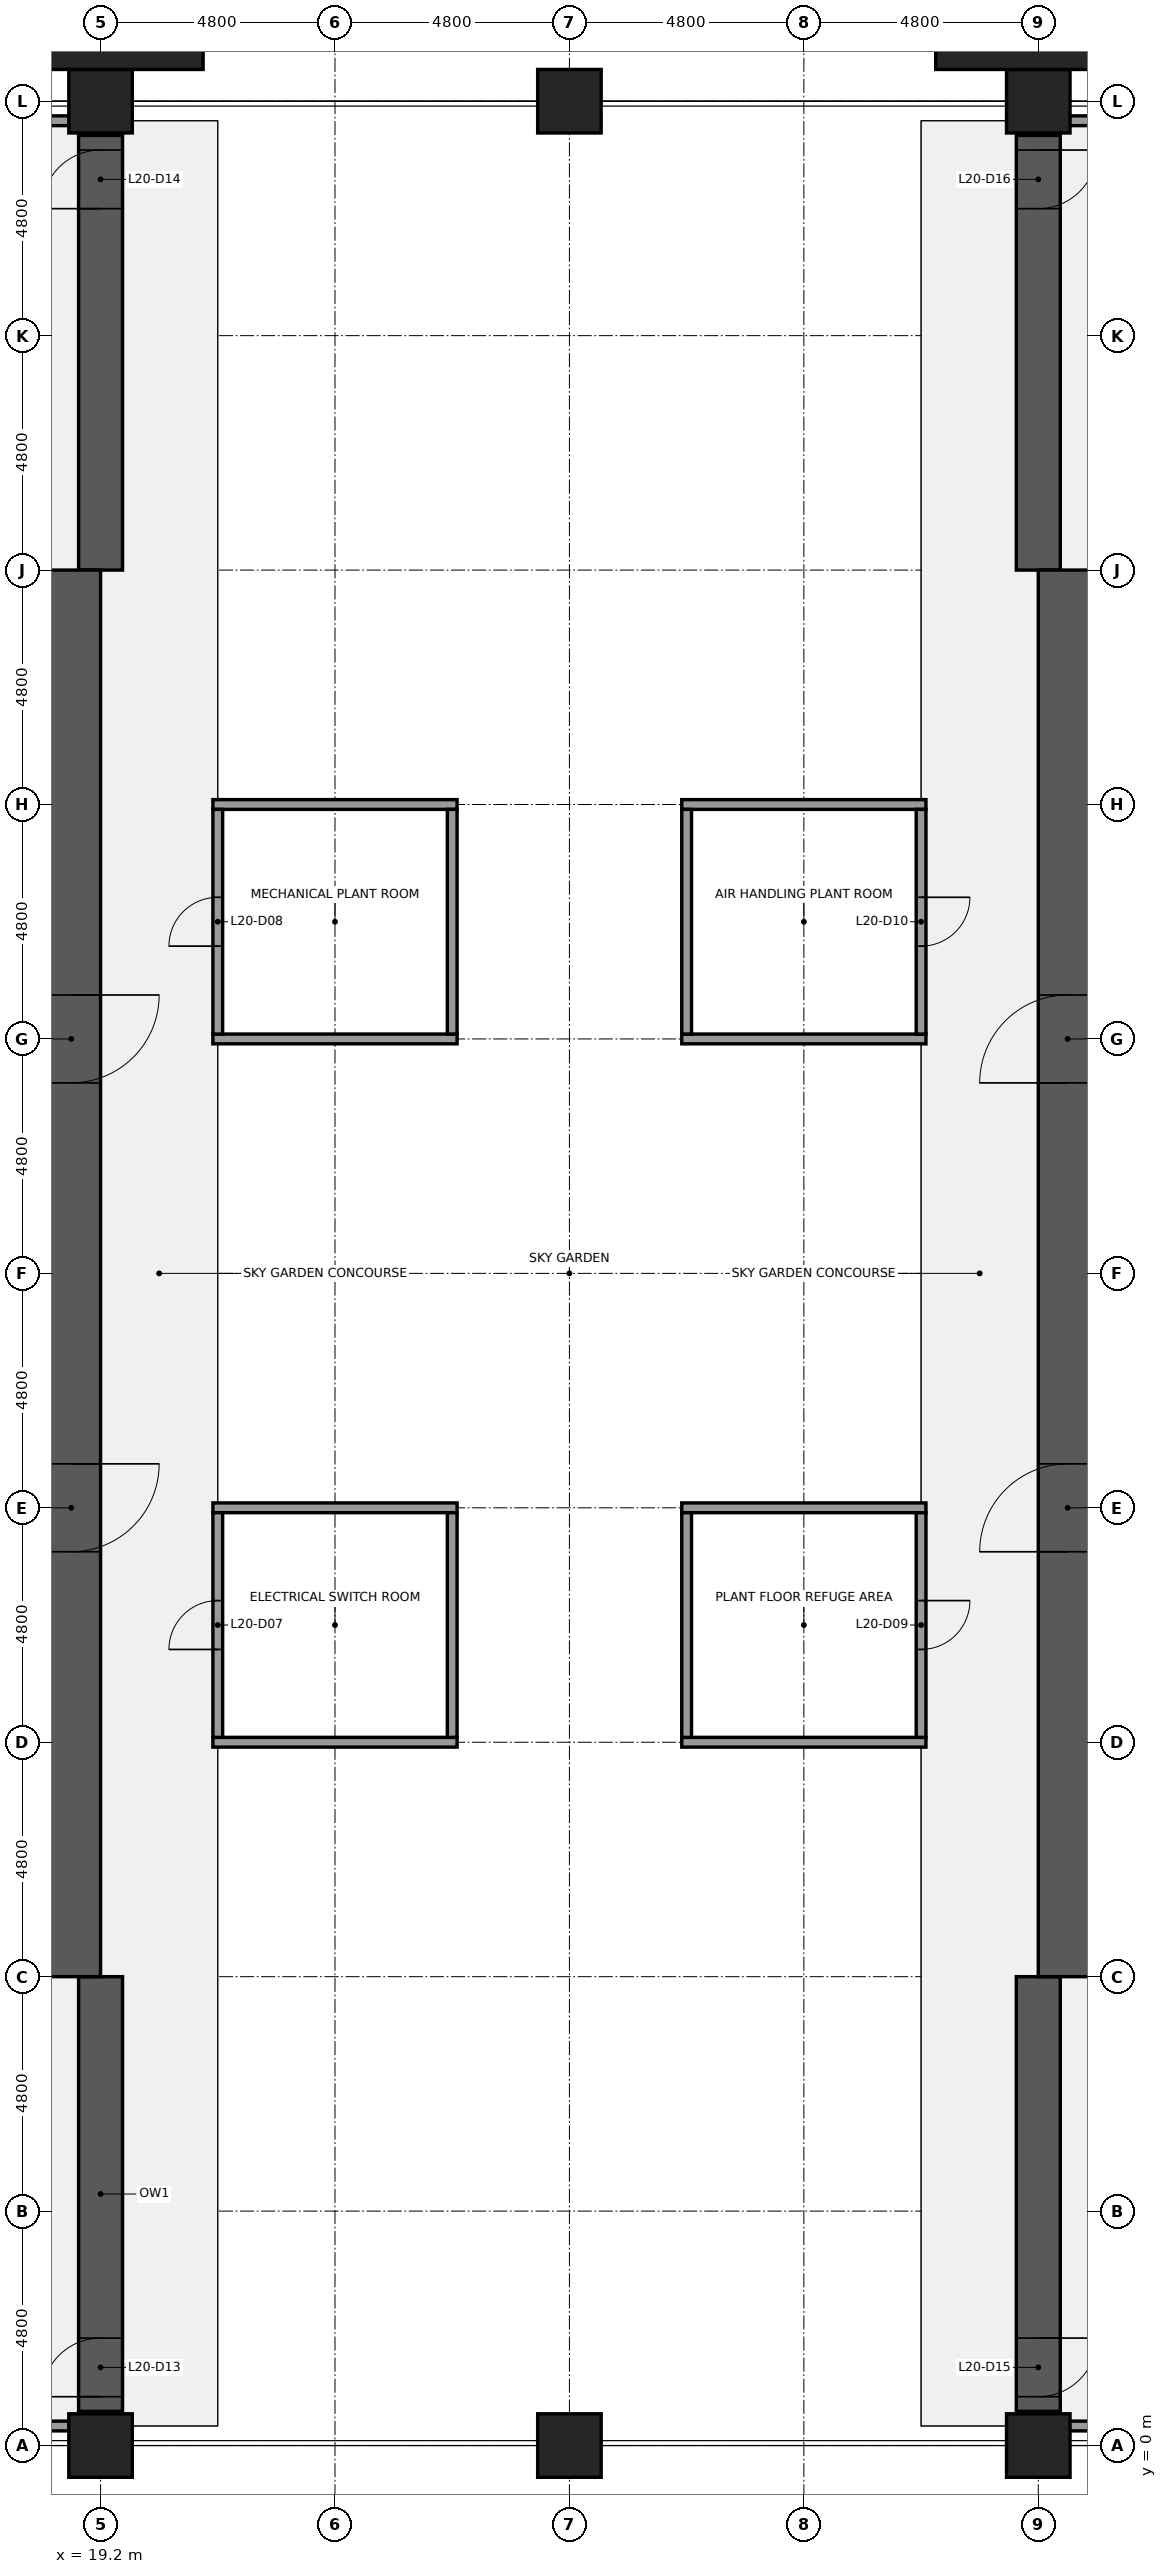
"""IFC4 building model, lengths in metres.
Left out: names, types, materials, properties, quantities, classifications, styles, units other than length and angle.
Written with IfcOpenShell. Run it as: python <this file> out.ifc"""

import sys

from ifc_helpers import new_model, si_unit, direction, frame, frame_2d, origin, origin_2d, place, context, subcontext, project, spatial, rectangle, extrude, element, fill, save


model = new_model("IFC4")
c1 = context("Model", 3, precision=1e-05, world=origin(), true_north=direction((0.0, 1.0)))
c2 = subcontext(c1, "Body", "Model", "MODEL_VIEW")
j1 = project(units=[si_unit("LENGTHUNIT", "METRE"), si_unit("PLANEANGLEUNIT", "RADIAN")], contexts=[c1])
p1 = place(None, origin())
s1 = spatial("IfcSite", under=j1, at=p1, CompositionType="ELEMENT")
p2 = place(p1, origin())
s2 = spatial("IfcBuilding", under=s1, at=p2, CompositionType="ELEMENT")
p3 = place(p2, frame((0.0, 0.0, 91.5)))
s3 = spatial("IfcBuildingStorey", under=s2, at=p3, CompositionType="ELEMENT", Elevation=91.5)
for number, where, z_axis, x_axis in (
    (1, (19.2, 0.0, 0.0), (0.0, 0.0, 1.0), (1.0, 0.0, 0.0)),
    (2, (28.8, 0.0, 0.0), (0.0, 0.0, 1.0), (1.0, 0.0, 0.0)),
    (3, (38.4, 0.0, 0.0), (0.0, 0.0, 1.0), (1.0, 0.0, 0.0)),
    (4, (19.2, 48.0, 0.0), (0.0, 0.0, 1.0), (1.0, 0.0, 0.0)),
    (5, (28.8, 48.0, 0.0), (0.0, 0.0, 1.0), (1.0, 0.0, 0.0)),
    (6, (38.4, 48.0, 0.0), (0.0, 0.0, 1.0), (1.0, 0.0, 0.0)),
):
    element("IfcColumn", number, at=place(p3, frame(where, z_axis=z_axis, x_axis=x_axis)), inside=s3, PredefinedType="COLUMN", context=c2, shape_type="SweptSolid", body=[
        extrude(rectangle(XDim=1.3, YDim=1.3, at=origin_2d()), origin(), (0.0, 0.0, 1.0), 12.6),
    ])
p4 = place(p3, frame((19.2, 0.7, 0.0), z_axis=(0.0, 0.0, 1.0), x_axis=(0.0, 1.0, 0.0)))
e7 = element("IfcWall", 7, at=p4, inside=s3, PredefinedType="SHEAR", context=c2, shape_type="SweptSolid", body=[
    extrude(rectangle(XDim=8.9, YDim=0.9, at=frame_2d((4.45, 0.0))), origin(), (0.0, 0.0, 1.0), 12.3),
])
p5 = place(p4, frame((0.3, 0.0, 0.0)))
e8 = element("IfcOpeningElement", 8, at=p5, cuts=e7, PredefinedType="OPENING", context=c2, shape_type="SweptSolid", body=[
    extrude(rectangle(XDim=1.2, YDim=2.1, at=frame_2d((0.6, 1.05))), frame((0.0, 0.46, 0.0), z_axis=(0.0, -1.0, 0.0), x_axis=(1.0, 0.0, 0.0)), (0.0, 0.0, 1.0), 0.92),
])
p6 = place(p3, frame((19.2, 38.4, 0.0), z_axis=(0.0, 0.0, 1.0), x_axis=(0.0, 1.0, 0.0)))
e9 = element("IfcWall", 9, at=p6, inside=s3, PredefinedType="SHEAR", context=c2, shape_type="SweptSolid", body=[
    extrude(rectangle(XDim=8.9, YDim=0.9, at=frame_2d((4.45, 0.0))), origin(), (0.0, 0.0, 1.0), 12.3),
])
p7 = place(p6, frame((7.4, 0.0, 0.0)))
e10 = element("IfcOpeningElement", 10, at=p7, cuts=e9, PredefinedType="OPENING", context=c2, shape_type="SweptSolid", body=[
    extrude(rectangle(XDim=1.2, YDim=2.1, at=frame_2d((0.6, 1.05))), frame((0.0, 0.46, 0.0), z_axis=(0.0, -1.0, 0.0), x_axis=(1.0, 0.0, 0.0)), (0.0, 0.0, 1.0), 0.92),
])
p8 = place(p3, frame((38.4, 0.7, 0.0), z_axis=(0.0, 0.0, 1.0), x_axis=(0.0, 1.0, 0.0)))
e11 = element("IfcWall", 11, at=p8, inside=s3, PredefinedType="SHEAR", context=c2, shape_type="SweptSolid", body=[
    extrude(rectangle(XDim=8.9, YDim=0.9, at=frame_2d((4.45, 0.0))), origin(), (0.0, 0.0, 1.0), 12.3),
])
p9 = place(p8, frame((0.3, 0.0, 0.0)))
e12 = element("IfcOpeningElement", 12, at=p9, cuts=e11, PredefinedType="OPENING", context=c2, shape_type="SweptSolid", body=[
    extrude(rectangle(XDim=1.2, YDim=2.1, at=frame_2d((0.6, 1.05))), frame((0.0, 0.46, 0.0), z_axis=(0.0, -1.0, 0.0), x_axis=(1.0, 0.0, 0.0)), (0.0, 0.0, 1.0), 0.92),
])
p10 = place(p3, frame((38.4, 38.4, 0.0), z_axis=(0.0, 0.0, 1.0), x_axis=(0.0, 1.0, 0.0)))
e13 = element("IfcWall", 13, at=p10, inside=s3, PredefinedType="SHEAR", context=c2, shape_type="SweptSolid", body=[
    extrude(rectangle(XDim=8.9, YDim=0.9, at=frame_2d((4.45, 0.0))), origin(), (0.0, 0.0, 1.0), 12.3),
])
p11 = place(p10, frame((7.4, 0.0, 0.0)))
e14 = element("IfcOpeningElement", 14, at=p11, cuts=e13, PredefinedType="OPENING", context=c2, shape_type="SweptSolid", body=[
    extrude(rectangle(XDim=1.2, YDim=2.1, at=frame_2d((0.6, 1.05))), frame((0.0, 0.46, 0.0), z_axis=(0.0, -1.0, 0.0), x_axis=(1.0, 0.0, 0.0)), (0.0, 0.0, 1.0), 0.92),
])
p12 = place(p3, frame((18.6, 38.4, 0.0), z_axis=(0.0, 0.0, 1.0), x_axis=(0.0, -1.0, 0.0)))
e15 = element("IfcWall", 15, at=p12, inside=s3, PredefinedType="SHEAR", context=c2, shape_type="SweptSolid", body=[
    extrude(rectangle(XDim=28.8, YDim=1.2, at=frame_2d((14.4, 0.0))), origin(), (0.0, 0.0, 1.0), 12.3),
])
p13 = place(p12, frame((18.3, 0.0, 0.0)))
e16 = element("IfcOpeningElement", 16, at=p13, cuts=e15, PredefinedType="OPENING", context=c2, shape_type="SweptSolid", body=[
    extrude(rectangle(XDim=1.8, YDim=2.1, at=frame_2d((0.9, 1.05))), frame((0.0, 0.61, 0.0), z_axis=(0.0, -1.0, 0.0), x_axis=(1.0, 0.0, 0.0)), (0.0, 0.0, 1.0), 1.22),
])
p14 = place(p12, frame((8.7, 0.0, 0.0)))
e17 = element("IfcOpeningElement", 17, at=p14, cuts=e15, PredefinedType="OPENING", context=c2, shape_type="SweptSolid", body=[
    extrude(rectangle(XDim=1.8, YDim=2.1, at=frame_2d((0.9, 1.05))), frame((0.0, 0.61, 0.0), z_axis=(0.0, -1.0, 0.0), x_axis=(1.0, 0.0, 0.0)), (0.0, 0.0, 1.0), 1.22),
])
p15 = place(p3, frame((39.0, 9.6, 0.0), z_axis=(0.0, 0.0, 1.0), x_axis=(0.0, 1.0, 0.0)))
e18 = element("IfcWall", 18, at=p15, inside=s3, PredefinedType="SHEAR", context=c2, shape_type="SweptSolid", body=[
    extrude(rectangle(XDim=28.8, YDim=1.2, at=frame_2d((14.4, 0.0))), origin(), (0.0, 0.0, 1.0), 12.3),
])
p16 = place(p15, frame((8.7, 0.0, 0.0)))
e19 = element("IfcOpeningElement", 19, at=p16, cuts=e18, PredefinedType="OPENING", context=c2, shape_type="SweptSolid", body=[
    extrude(rectangle(XDim=1.8, YDim=2.1, at=frame_2d((0.9, 1.05))), frame((0.0, 0.61, 0.0), z_axis=(0.0, -1.0, 0.0), x_axis=(1.0, 0.0, 0.0)), (0.0, 0.0, 1.0), 1.22),
])
p17 = place(p15, frame((18.3, 0.0, 0.0)))
e20 = element("IfcOpeningElement", 20, at=p17, cuts=e18, PredefinedType="OPENING", context=c2, shape_type="SweptSolid", body=[
    extrude(rectangle(XDim=1.8, YDim=2.1, at=frame_2d((0.9, 1.05))), frame((0.0, 0.61, 0.0), z_axis=(0.0, -1.0, 0.0), x_axis=(1.0, 0.0, 0.0)), (0.0, 0.0, 1.0), 1.22),
])
for number, where, z_axis, x_axis in (
    (21, (15.5, 0.4, 0.0), (0.0, 0.0, 1.0), (1.0, 0.0, 0.0)),
    (22, (38.3, 0.4, 0.0), (0.0, 0.0, 1.0), (1.0, 0.0, 0.0)),
):
    element("IfcWall", number, at=place(p3, frame(where, z_axis=z_axis, x_axis=x_axis)), inside=s3, PredefinedType="PARTITIONING", context=c2, shape_type="SweptSolid", body=[
        extrude(rectangle(XDim=3.8, YDim=0.2, at=frame_2d((1.9, 0.0))), origin(), (0.0, 0.0, 1.0), 11.309),
    ])
for number, where, z_axis, x_axis in (
    (23, (21.5, 14.4, 0.0), (0.0, 0.0, 1.0), (1.0, 0.0, 0.0)),
    (24, (31.1, 14.4, 0.0), (0.0, 0.0, 1.0), (1.0, 0.0, 0.0)),
    (25, (21.5, 19.2, 0.0), (0.0, 0.0, 1.0), (1.0, 0.0, 0.0)),
    (26, (31.1, 19.2, 0.0), (0.0, 0.0, 1.0), (1.0, 0.0, 0.0)),
    (27, (21.5, 28.8, 0.0), (0.0, 0.0, 1.0), (1.0, 0.0, 0.0)),
    (28, (31.1, 28.8, 0.0), (0.0, 0.0, 1.0), (1.0, 0.0, 0.0)),
    (29, (21.5, 33.6, 0.0), (0.0, 0.0, 1.0), (1.0, 0.0, 0.0)),
    (30, (31.1, 33.6, 0.0), (0.0, 0.0, 1.0), (1.0, 0.0, 0.0)),
):
    element("IfcWall", number, at=place(p3, frame(where, z_axis=z_axis, x_axis=x_axis)), inside=s3, PredefinedType="PARTITIONING", context=c2, shape_type="SweptSolid", body=[
        extrude(rectangle(XDim=5.0, YDim=0.2, at=frame_2d((2.5, 0.0))), origin(), (0.0, 0.0, 1.0), 11.309),
    ])
for number, where, z_axis, x_axis in (
    (31, (15.5, 47.6, 0.0), (0.0, 0.0, 1.0), (1.0, 0.0, 0.0)),
    (32, (38.3, 47.6, 0.0), (0.0, 0.0, 1.0), (1.0, 0.0, 0.0)),
):
    element("IfcWall", number, at=place(p3, frame(where, z_axis=z_axis, x_axis=x_axis)), inside=s3, PredefinedType="PARTITIONING", context=c2, shape_type="SweptSolid", body=[
        extrude(rectangle(XDim=3.8, YDim=0.2, at=frame_2d((1.9, 0.0))), origin(), (0.0, 0.0, 1.0), 11.309),
    ])
p18 = place(p3, frame((21.6, 14.5, 0.0), z_axis=(0.0, 0.0, 1.0), x_axis=(0.0, 1.0, 0.0)))
e33 = element("IfcWall", 33, at=p18, inside=s3, PredefinedType="PARTITIONING", context=c2, shape_type="SweptSolid", body=[
    extrude(rectangle(XDim=4.6, YDim=0.2, at=frame_2d((2.3, 0.0))), origin(), (0.0, 0.0, 1.0), 11.309),
])
p19 = place(p18, frame((1.8, 0.0, 0.0)))
e34 = element("IfcOpeningElement", 34, at=p19, cuts=e33, PredefinedType="OPENING", context=c2, shape_type="SweptSolid", body=[
    extrude(rectangle(XDim=1.0, YDim=2.1, at=frame_2d((0.5, 1.05))), frame((0.0, 0.11, 0.0), z_axis=(0.0, -1.0, 0.0), x_axis=(1.0, 0.0, 0.0)), (0.0, 0.0, 1.0), 0.22),
])
p20 = place(p3, frame((21.6, 28.9, 0.0), z_axis=(0.0, 0.0, 1.0), x_axis=(0.0, 1.0, 0.0)))
e35 = element("IfcWall", 35, at=p20, inside=s3, PredefinedType="PARTITIONING", context=c2, shape_type="SweptSolid", body=[
    extrude(rectangle(XDim=4.6, YDim=0.2, at=frame_2d((2.3, 0.0))), origin(), (0.0, 0.0, 1.0), 11.309),
])
p21 = place(p20, frame((1.8, 0.0, 0.0)))
e36 = element("IfcOpeningElement", 36, at=p21, cuts=e35, PredefinedType="OPENING", context=c2, shape_type="SweptSolid", body=[
    extrude(rectangle(XDim=1.0, YDim=2.1, at=frame_2d((0.5, 1.05))), frame((0.0, 0.11, 0.0), z_axis=(0.0, -1.0, 0.0), x_axis=(1.0, 0.0, 0.0)), (0.0, 0.0, 1.0), 0.22),
])
for number, where, z_axis, x_axis in (
    (37, (26.4, 14.5, 0.0), (0.0, 0.0, 1.0), (0.0, 1.0, 0.0)),
    (38, (26.4, 28.9, 0.0), (0.0, 0.0, 1.0), (0.0, 1.0, 0.0)),
    (39, (31.2, 14.5, 0.0), (0.0, 0.0, 1.0), (0.0, 1.0, 0.0)),
    (40, (31.2, 28.9, 0.0), (0.0, 0.0, 1.0), (0.0, 1.0, 0.0)),
):
    element("IfcWall", number, at=place(p3, frame(where, z_axis=z_axis, x_axis=x_axis)), inside=s3, PredefinedType="PARTITIONING", context=c2, shape_type="SweptSolid", body=[
        extrude(rectangle(XDim=4.6, YDim=0.2, at=frame_2d((2.3, 0.0))), origin(), (0.0, 0.0, 1.0), 11.309),
    ])
p22 = place(p3, frame((36.0, 14.5, 0.0), z_axis=(0.0, 0.0, 1.0), x_axis=(0.0, 1.0, 0.0)))
e41 = element("IfcWall", 41, at=p22, inside=s3, PredefinedType="PARTITIONING", context=c2, shape_type="SweptSolid", body=[
    extrude(rectangle(XDim=4.6, YDim=0.2, at=frame_2d((2.3, 0.0))), origin(), (0.0, 0.0, 1.0), 11.309),
])
p23 = place(p22, frame((1.8, 0.0, 0.0)))
e42 = element("IfcOpeningElement", 42, at=p23, cuts=e41, PredefinedType="OPENING", context=c2, shape_type="SweptSolid", body=[
    extrude(rectangle(XDim=1.0, YDim=2.1, at=frame_2d((0.5, 1.05))), frame((0.0, 0.11, 0.0), z_axis=(0.0, -1.0, 0.0), x_axis=(1.0, 0.0, 0.0)), (0.0, 0.0, 1.0), 0.22),
])
p24 = place(p3, frame((36.0, 28.9, 0.0), z_axis=(0.0, 0.0, 1.0), x_axis=(0.0, 1.0, 0.0)))
e43 = element("IfcWall", 43, at=p24, inside=s3, PredefinedType="PARTITIONING", context=c2, shape_type="SweptSolid", body=[
    extrude(rectangle(XDim=4.6, YDim=0.2, at=frame_2d((2.3, 0.0))), origin(), (0.0, 0.0, 1.0), 11.309),
])
p25 = place(p24, frame((1.8, 0.0, 0.0)))
e44 = element("IfcOpeningElement", 44, at=p25, cuts=e43, PredefinedType="OPENING", context=c2, shape_type="SweptSolid", body=[
    extrude(rectangle(XDim=1.0, YDim=2.1, at=frame_2d((0.5, 1.05))), frame((0.0, 0.11, 0.0), z_axis=(0.0, -1.0, 0.0), x_axis=(1.0, 0.0, 0.0)), (0.0, 0.0, 1.0), 0.22),
])
for number, where, z_axis, x_axis in (
    (45, (19.2, -1.075, 0.0), (0.0, 0.0, 1.0), (1.0, 0.0, 0.0)),
    (46, (38.4, -1.075, 0.0), (0.0, 0.0, 1.0), (1.0, 0.0, 0.0)),
    (47, (19.2, 49.075, 0.0), (0.0, 0.0, 1.0), (1.0, 0.0, 0.0)),
    (48, (38.4, 49.075, 0.0), (0.0, 0.0, 1.0), (1.0, 0.0, 0.0)),
):
    element("IfcColumn", number, at=place(p3, frame(where, z_axis=z_axis, x_axis=x_axis)), inside=s3, PredefinedType="PILASTER", context=c2, shape_type="SweptSolid", body=[
        extrude(rectangle(XDim=4.2, YDim=0.85, at=origin_2d()), origin(), (0.0, 0.0, 1.0), 12.6),
    ])
p26 = place(p13, origin())
e49 = element("IfcDoor", 49, at=p26, inside=s3, OperationType="DOUBLE_DOOR_SINGLE_SWING", PredefinedType="DOOR", context=c2, shape_type="SweptSolid", body=[
    extrude(rectangle(XDim=1.8, YDim=2.1, at=frame_2d((0.9, 1.05))), frame((0.0, 0.025, 0.0), z_axis=(0.0, -1.0, 0.0), x_axis=(1.0, 0.0, 0.0)), (0.0, 0.0, 1.0), 0.05),
])
fill(e16, e49)
p27 = place(p14, origin())
e50 = element("IfcDoor", 50, at=p27, inside=s3, OperationType="DOUBLE_DOOR_SINGLE_SWING", PredefinedType="DOOR", context=c2, shape_type="SweptSolid", body=[
    extrude(rectangle(XDim=1.8, YDim=2.1, at=frame_2d((0.9, 1.05))), frame((0.0, 0.025, 0.0), z_axis=(0.0, -1.0, 0.0), x_axis=(1.0, 0.0, 0.0)), (0.0, 0.0, 1.0), 0.05),
])
fill(e17, e50)
p28 = place(p16, origin())
e51 = element("IfcDoor", 51, at=p28, inside=s3, OperationType="DOUBLE_DOOR_SINGLE_SWING", PredefinedType="DOOR", context=c2, shape_type="SweptSolid", body=[
    extrude(rectangle(XDim=1.8, YDim=2.1, at=frame_2d((0.9, 1.05))), frame((0.0, 0.025, 0.0), z_axis=(0.0, -1.0, 0.0), x_axis=(1.0, 0.0, 0.0)), (0.0, 0.0, 1.0), 0.05),
])
fill(e19, e51)
p29 = place(p17, origin())
e52 = element("IfcDoor", 52, at=p29, inside=s3, OperationType="DOUBLE_DOOR_SINGLE_SWING", PredefinedType="DOOR", context=c2, shape_type="SweptSolid", body=[
    extrude(rectangle(XDim=1.8, YDim=2.1, at=frame_2d((0.9, 1.05))), frame((0.0, 0.025, 0.0), z_axis=(0.0, -1.0, 0.0), x_axis=(1.0, 0.0, 0.0)), (0.0, 0.0, 1.0), 0.05),
])
fill(e20, e52)
p30 = place(p19, origin())
e53 = element("IfcDoor", 53, at=p30, inside=s3, OperationType="SINGLE_SWING_LEFT", PredefinedType="DOOR", context=c2, shape_type="SweptSolid", body=[
    extrude(rectangle(XDim=1.0, YDim=2.1, at=frame_2d((0.5, 1.05))), frame((0.0, 0.025, 0.0), z_axis=(0.0, -1.0, 0.0), x_axis=(1.0, 0.0, 0.0)), (0.0, 0.0, 1.0), 0.05),
])
fill(e34, e53)
p31 = place(p21, origin())
e54 = element("IfcDoor", 54, at=p31, inside=s3, OperationType="SINGLE_SWING_LEFT", PredefinedType="DOOR", context=c2, shape_type="SweptSolid", body=[
    extrude(rectangle(XDim=1.0, YDim=2.1, at=frame_2d((0.5, 1.05))), frame((0.0, 0.025, 0.0), z_axis=(0.0, -1.0, 0.0), x_axis=(1.0, 0.0, 0.0)), (0.0, 0.0, 1.0), 0.05),
])
fill(e36, e54)
p32 = place(p23, origin())
e55 = element("IfcDoor", 55, at=p32, inside=s3, OperationType="SINGLE_SWING_RIGHT", PredefinedType="DOOR", context=c2, shape_type="SweptSolid", body=[
    extrude(rectangle(XDim=1.0, YDim=2.1, at=frame_2d((0.5, 1.05))), frame((0.0, 0.025, 0.0), z_axis=(0.0, -1.0, 0.0), x_axis=(1.0, 0.0, 0.0)), (0.0, 0.0, 1.0), 0.05),
])
fill(e42, e55)
p33 = place(p25, origin())
e56 = element("IfcDoor", 56, at=p33, inside=s3, OperationType="SINGLE_SWING_RIGHT", PredefinedType="DOOR", context=c2, shape_type="SweptSolid", body=[
    extrude(rectangle(XDim=1.0, YDim=2.1, at=frame_2d((0.5, 1.05))), frame((0.0, 0.025, 0.0), z_axis=(0.0, -1.0, 0.0), x_axis=(1.0, 0.0, 0.0)), (0.0, 0.0, 1.0), 0.05),
])
fill(e44, e56)
p34 = place(p5, origin())
e57 = element("IfcDoor", 57, at=p34, inside=s3, OperationType="SINGLE_SWING_LEFT", PredefinedType="DOOR", context=c2, shape_type="SweptSolid", body=[
    extrude(rectangle(XDim=1.2, YDim=2.1, at=frame_2d((0.6, 1.05))), frame((0.0, 0.025, 0.0), z_axis=(0.0, -1.0, 0.0), x_axis=(1.0, 0.0, 0.0)), (0.0, 0.0, 1.0), 0.05),
])
fill(e8, e57)
p35 = place(p7, origin())
e58 = element("IfcDoor", 58, at=p35, inside=s3, OperationType="SINGLE_SWING_LEFT", PredefinedType="DOOR", context=c2, shape_type="SweptSolid", body=[
    extrude(rectangle(XDim=1.2, YDim=2.1, at=frame_2d((0.6, 1.05))), frame((0.0, 0.025, 0.0), z_axis=(0.0, -1.0, 0.0), x_axis=(1.0, 0.0, 0.0)), (0.0, 0.0, 1.0), 0.05),
])
fill(e10, e58)
p36 = place(p9, origin())
e59 = element("IfcDoor", 59, at=p36, inside=s3, OperationType="SINGLE_SWING_RIGHT", PredefinedType="DOOR", context=c2, shape_type="SweptSolid", body=[
    extrude(rectangle(XDim=1.2, YDim=2.1, at=frame_2d((0.6, 1.05))), frame((0.0, 0.025, 0.0), z_axis=(0.0, -1.0, 0.0), x_axis=(1.0, 0.0, 0.0)), (0.0, 0.0, 1.0), 0.05),
])
fill(e12, e59)
p37 = place(p11, origin())
e60 = element("IfcDoor", 60, at=p37, inside=s3, OperationType="SINGLE_SWING_RIGHT", PredefinedType="DOOR", context=c2, shape_type="SweptSolid", body=[
    extrude(rectangle(XDim=1.2, YDim=2.1, at=frame_2d((0.6, 1.05))), frame((0.0, 0.025, 0.0), z_axis=(0.0, -1.0, 0.0), x_axis=(1.0, 0.0, 0.0)), (0.0, 0.0, 1.0), 0.05),
])
fill(e14, e60)
save(model, sys.argv[1])
